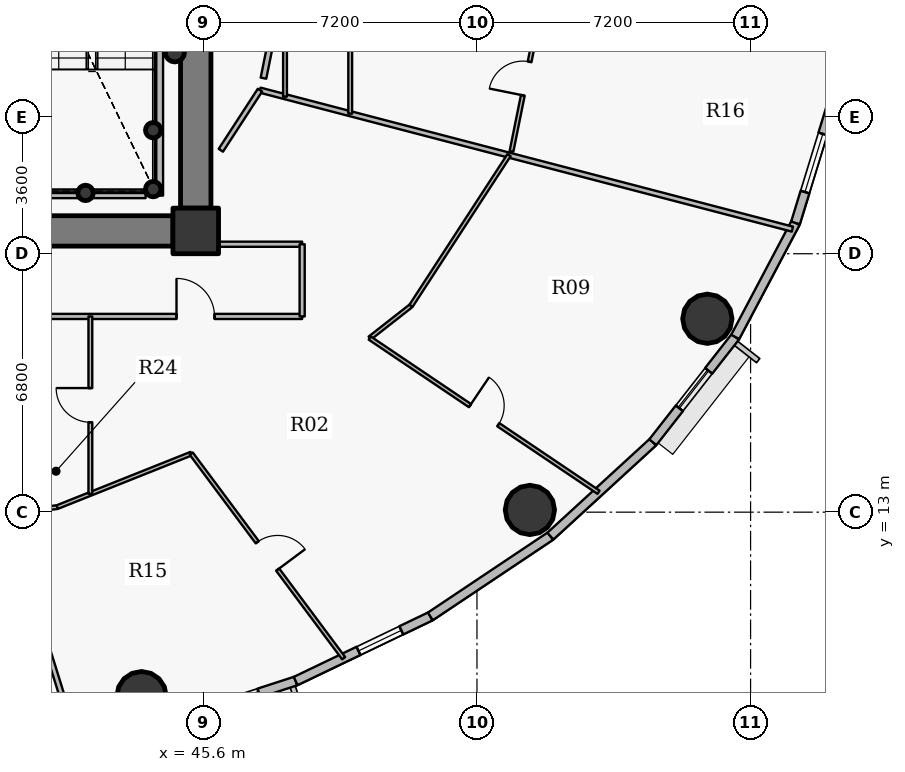
"""IFC4 building model, lengths in metres.
Left out: names, types, materials, properties, quantities, classifications, styles, units other than length and angle.
Written with IfcOpenShell. Run it as: python <this file> out.ifc"""

import sys

from ifc_helpers import new_model, si_unit, direction, frame, frame_2d, origin, origin_2d, place, context, subcontext, project, spatial, rectangle, hollow_circle, extrude, source, transform, mapped, element, fill, save


model = new_model("IFC4")
c1 = context("Model", 3, precision=1e-05, world=origin(), true_north=direction((0.0, 1.0)))
c2 = subcontext(c1, "Body", "Model", "MODEL_VIEW")
j1 = project(units=[si_unit("LENGTHUNIT", "METRE"), si_unit("PLANEANGLEUNIT", "RADIAN")], contexts=[c1])
p1 = place(None, origin())
s1 = spatial("IfcSite", under=j1, at=p1, CompositionType="ELEMENT")
p2 = place(p1, origin())
s2 = spatial("IfcBuilding", under=s1, at=p2, CompositionType="ELEMENT")
p3 = place(p2, frame((0.0, 0.0, 182.4)))
s3 = spatial("IfcBuildingStorey", under=s2, at=p3, CompositionType="ELEMENT", Elevation=182.4)
p4 = place(p3, frame((45.4, 20.4, 0.0), z_axis=(0.0, 0.0, 1.0), x_axis=(1.0, 0.0, 0.0)))
e1 = element("IfcColumn", 1, at=p4, inside=s3, PredefinedType="COLUMN", context=c2, shape_type="SweptSolid", body=[
    extrude(rectangle(XDim=1.2, YDim=1.2, at=origin_2d()), origin(), (0.0, 0.0, 1.0), 3.75),
])
for number, where, z_axis, x_axis in (
    (2, (44.28, 21.5, 0.0), (0.0, 0.0, 1.0), (1.0, 0.0, 0.0)),
    (3, (44.28, 23.05, 0.0), (0.0, 0.0, 1.0), (1.0, 0.0, 0.0)),
    (4, (42.5, 21.4, 0.0), (0.0, 0.0, 1.0), (1.0, 0.0, 0.0)),
):
    element("IfcColumn", number, at=place(p3, frame(where, z_axis=z_axis, x_axis=x_axis)), inside=s3, PredefinedType="COLUMN", context=c2, shape_type="SweptSolid", body=[
        extrude(hollow_circle(Radius=0.203, WallThickness=0.016, at=origin_2d()), origin(), (0.0, 0.0, 1.0), 3.75),
    ])
p5 = place(p3, frame((45.4, 33.0, 0.0), z_axis=(0.0, 0.0, 1.0), x_axis=(0.0, -1.0, 0.0)))
e5 = element("IfcWall", 5, at=p5, inside=s3, PredefinedType="SHEAR", context=c2, shape_type="SweptSolid", body=[
    extrude(rectangle(XDim=12.0, YDim=0.8, at=frame_2d((6.0, 0.0))), origin(), (0.0, 0.0, 1.0), 2.95),
])
p6 = place(p3, frame((44.8, 20.4, 0.0), z_axis=(0.0, 0.0, 1.0), x_axis=(-1.0, 0.0, 0.0)))
e6 = element("IfcWall", 6, at=p6, inside=s3, PredefinedType="SHEAR", context=c2, shape_type="SweptSolid", body=[
    extrude(rectangle(XDim=17.6, YDim=0.8, at=frame_2d((8.8, 0.0))), origin(), (0.0, 0.0, 1.0), 2.95),
])
p7 = place(p6, frame((9.55, 0.0, 0.0)))
e7 = element("IfcOpeningElement", 7, at=p7, cuts=e6, PredefinedType="OPENING", context=c2, shape_type="SweptSolid", body=[
    extrude(rectangle(XDim=1.15, YDim=2.15, at=origin_2d()), frame((0.575, 0.41, 1.075), z_axis=(0.0, -1.0, 0.0), x_axis=(1.0, 0.0, 0.0)), (0.0, 0.0, 1.0), 0.82),
])
for number, where, z_axis, x_axis in (
    (8, (43.973, 8.159, 0.0), (0.0, 0.0, 1.0), (1.0, 0.0, 0.0)),
    (9, (54.192, 13.058, 0.0), (0.0, 0.0, 1.0), (1.0, 0.0, 0.0)),
    (10, (58.863, 18.089, 0.0), (0.0, 0.0, 1.0), (1.0, 0.0, 0.0)),
):
    element("IfcColumn", number, at=place(p3, frame(where, z_axis=z_axis, x_axis=x_axis)), inside=s3, PredefinedType="COLUMN", context=c2, shape_type="SweptSolid", body=[
        extrude(hollow_circle(Radius=0.65, WallThickness=0.04, at=origin_2d()), origin(), (0.0, 0.0, 1.0), 3.75),
    ])
p8 = place(p3, frame((44.85, 25.1, 0.0), z_axis=(0.0, 0.0, 1.0), x_axis=(1.0, 0.0, 0.0)))
e11 = element("IfcColumn", 11, at=p8, inside=s3, PredefinedType="COLUMN", context=c2, shape_type="SweptSolid", body=[
    extrude(hollow_circle(Radius=0.254, WallThickness=0.02, at=origin_2d()), origin(), (0.0, 0.0, 1.0), 3.75),
])
p9 = place(p3, frame((48.03, 8.556, 0.0), z_axis=(0.0, 0.0, 1.0), x_axis=(-0.951209870236, -0.30854462038, 0.0)))
e12 = element("IfcWall", 12, at=p9, inside=s3, PredefinedType="SOLIDWALL", context=c2, shape_type="SweptSolid", body=[
    extrude(rectangle(XDim=4.038, YDim=0.24, at=frame_2d((2.019, 0.0))), origin(), (0.0, 0.0, 1.0), 3.5),
])
p10 = place(p9, frame((1.019, 0.0, 0.9)))
e13 = element("IfcOpeningElement", 13, at=p10, cuts=e12, PredefinedType="OPENING", context=c2, shape_type="SweptSolid", body=[
    extrude(rectangle(XDim=2.0, YDim=1.75, at=origin_2d()), frame((1.0, 0.13, 0.875), z_axis=(0.0, -1.0, 0.0), x_axis=(1.0, 0.0, 0.0)), (0.0, 0.0, 1.0), 0.26),
])
p11 = place(p3, frame((51.573, 10.257, 0.0), z_axis=(0.0, 0.0, 1.0), x_axis=(-0.901564733809, -0.432644231155, 0.0)))
e14 = element("IfcWall", 14, at=p11, inside=s3, PredefinedType="SOLIDWALL", context=c2, shape_type="SweptSolid", body=[
    extrude(rectangle(XDim=3.93, YDim=0.24, at=frame_2d((1.965, 0.0))), origin(), (0.0, 0.0, 1.0), 3.5),
])
p12 = place(p11, frame((0.848, 0.0, 0.9)))
e15 = element("IfcOpeningElement", 15, at=p12, cuts=e14, PredefinedType="OPENING", context=c2, shape_type="SweptSolid", body=[
    extrude(rectangle(XDim=1.25, YDim=1.65, at=origin_2d()), frame((0.625, 0.13, 0.825), z_axis=(0.0, -1.0, 0.0), x_axis=(1.0, 0.0, 0.0)), (0.0, 0.0, 1.0), 0.26),
])
p13 = place(p3, frame((54.732, 12.369, 0.0), z_axis=(0.0, 0.0, 1.0), x_axis=(-0.831228998277, -0.555930168657, 0.0)))
e16 = element("IfcWall", 16, at=p13, inside=s3, PredefinedType="SOLIDWALL", context=c2, shape_type="SweptSolid", body=[
    extrude(rectangle(XDim=3.8, YDim=0.24, at=frame_2d((1.9, 0.0))), origin(), (0.0, 0.0, 1.0), 3.5),
])
p14 = place(p3, frame((57.428, 14.842, 0.0), z_axis=(0.0, 0.0, 1.0), x_axis=(-0.737076565834, -0.675809245349, 0.0)))
e17 = element("IfcWall", 17, at=p14, inside=s3, PredefinedType="SOLIDWALL", context=c2, shape_type="SweptSolid", body=[
    extrude(rectangle(XDim=3.658, YDim=0.24, at=frame_2d((1.829, 0.0))), origin(), (0.0, 0.0, 1.0), 3.5),
])
p15 = place(p3, frame((59.596, 17.612, 0.0), z_axis=(0.0, 0.0, 1.0), x_axis=(-0.616287674549, -0.787521112224, 0.0)))
e18 = element("IfcWall", 18, at=p15, inside=s3, PredefinedType="SOLIDWALL", context=c2, shape_type="SweptSolid", body=[
    extrude(rectangle(XDim=3.517, YDim=0.24, at=frame_2d((1.759, 0.0))), origin(), (0.0, 0.0, 1.0), 3.5),
])
p16 = place(p15, frame((1.134, 0.0, 0.9)))
e19 = element("IfcOpeningElement", 19, at=p16, cuts=e18, PredefinedType="OPENING", context=c2, shape_type="SweptSolid", body=[
    extrude(rectangle(XDim=1.25, YDim=1.65, at=origin_2d()), frame((0.625, 0.13, 0.825), z_axis=(0.0, -1.0, 0.0), x_axis=(1.0, 0.0, 0.0)), (0.0, 0.0, 1.0), 0.26),
])
p17 = place(p3, frame((61.183, 20.611, 0.0), z_axis=(0.0, 0.0, 1.0), x_axis=(-0.467586874938, -0.88394712194, 0.0)))
e20 = element("IfcWall", 20, at=p17, inside=s3, PredefinedType="SOLIDWALL", context=c2, shape_type="SweptSolid", body=[
    extrude(rectangle(XDim=3.393, YDim=0.24, at=frame_2d((1.697, 0.0))), origin(), (0.0, 0.0, 1.0), 3.5),
])
p18 = place(p3, frame((62.15, 23.766, 0.0), z_axis=(0.0, 0.0, 1.0), x_axis=(-0.293097995113, -0.956082405058, 0.0)))
e21 = element("IfcWall", 21, at=p18, inside=s3, PredefinedType="SOLIDWALL", context=c2, shape_type="SweptSolid", body=[
    extrude(rectangle(XDim=3.3, YDim=0.24, at=frame_2d((1.65, 0.0))), origin(), (0.0, 0.0, 1.0), 3.5),
])
p19 = place(p18, frame((0.85, 0.0, 0.9)))
e22 = element("IfcOpeningElement", 22, at=p19, cuts=e21, PredefinedType="OPENING", context=c2, shape_type="SweptSolid", body=[
    extrude(rectangle(XDim=1.6, YDim=1.75, at=origin_2d()), frame((0.8, 0.13, 0.875), z_axis=(0.0, -1.0, 0.0), x_axis=(1.0, 0.0, 0.0)), (0.0, 0.0, 1.0), 0.26),
])
p20 = place(p3, frame((36.0, 12.419, 0.0), z_axis=(0.0, 0.0, 1.0), x_axis=(0.992396615981, 0.123081097612, 0.0)))
e23 = element("IfcWall", 23, at=p20, inside=s3, PredefinedType="PARTITIONING", context=c2, shape_type="SweptSolid", body=[
    extrude(rectangle(XDim=5.798, YDim=0.1, at=frame_2d((2.899, 0.0))), origin(), (0.0, 0.0, 1.0), 2.935),
])
p21 = place(p3, frame((38.764, 18.15, 0.0), z_axis=(0.0, 0.0, 1.0), x_axis=(0.298084348379, -0.954539533624, 0.0)))
e24 = element("IfcWall", 24, at=p21, inside=s3, PredefinedType="PARTITIONING", context=c2, shape_type="SweptSolid", body=[
    extrude(rectangle(XDim=11.74, YDim=0.135, at=frame_2d((5.87, 0.0))), origin(), (0.0, 0.0, 1.0), 2.935),
])
p22 = place(p3, frame((38.764, 18.15, 0.0), z_axis=(0.0, 0.0, 1.0), x_axis=(1.0, 0.0, 0.0)))
e25 = element("IfcWall", 25, at=p22, inside=s3, PredefinedType="PARTITIONING", context=c2, shape_type="SweptSolid", body=[
    extrude(rectangle(XDim=9.436, YDim=0.135, at=frame_2d((4.718, 0.0))), origin(), (0.0, 0.0, 1.0), 2.935),
])
p23 = place(p22, frame((6.13, 0.0, 0.0)))
e26 = element("IfcOpeningElement", 26, at=p23, cuts=e25, PredefinedType="OPENING", context=c2, shape_type="SweptSolid", body=[
    extrude(rectangle(XDim=1.0, YDim=2.15, at=origin_2d()), frame((0.5, 0.078, 1.075), z_axis=(0.0, -1.0, 0.0), x_axis=(1.0, 0.0, 0.0)), (0.0, 0.0, 1.0), 0.155),
])
p24 = place(p3, frame((41.754, 13.133, 0.0), z_axis=(0.0, 0.0, 1.0), x_axis=(0.928786664236, 0.370614803182, 0.0)))
e27 = element("IfcWall", 27, at=p24, inside=s3, PredefinedType="PARTITIONING", context=c2, shape_type="SweptSolid", body=[
    extrude(rectangle(XDim=3.798, YDim=0.1, at=frame_2d((1.899, 0.0))), origin(), (0.0, 0.0, 1.0), 2.935),
])
p25 = place(p3, frame((42.627, 13.481, 0.0), z_axis=(0.0, 0.0, 1.0), x_axis=(0.0, 1.0, 0.0)))
e28 = element("IfcWall", 28, at=p25, inside=s3, PredefinedType="PARTITIONING", context=c2, shape_type="SweptSolid", body=[
    extrude(rectangle(XDim=4.669, YDim=0.1, at=frame_2d((2.334, 0.0))), origin(), (0.0, 0.0, 1.0), 3.5),
])
p26 = place(p25, frame((1.885, 0.0, 0.0)))
e29 = element("IfcOpeningElement", 29, at=p26, cuts=e28, PredefinedType="OPENING", context=c2, shape_type="SweptSolid", body=[
    extrude(rectangle(XDim=0.9, YDim=2.1, at=origin_2d()), frame((0.45, 0.06, 1.05), z_axis=(0.0, -1.0, 0.0), x_axis=(1.0, 0.0, 0.0)), (0.0, 0.0, 1.0), 0.12),
])
p27 = place(p3, frame((44.44, 21.33, 0.0), z_axis=(0.0, 0.0, 1.0), x_axis=(0.0, 1.0, 0.0)))
e30 = element("IfcWall", 30, at=p27, inside=s3, PredefinedType="PARTITIONING", context=c2, shape_type="SweptSolid", body=[
    extrude(rectangle(XDim=8.52, YDim=0.2, at=frame_2d((4.26, 0.0))), origin(), (0.0, 0.0, 1.0), 3.5),
])
p28 = place(p3, frame((45.282, 14.54, 0.0), z_axis=(0.0, 0.0, 1.0), x_axis=(0.597407497301, -0.801937829366, 0.0)))
e31 = element("IfcWall", 31, at=p28, inside=s3, PredefinedType="PARTITIONING", context=c2, shape_type="SweptSolid", body=[
    extrude(rectangle(XDim=6.713, YDim=0.1, at=frame_2d((3.356, 0.0))), origin(), (0.0, 0.0, 1.0), 2.935),
])
p29 = place(p28, frame((2.906, 0.0, 0.0)))
e32 = element("IfcOpeningElement", 32, at=p29, cuts=e31, PredefinedType="OPENING", context=c2, shape_type="SweptSolid", body=[
    extrude(rectangle(XDim=0.9, YDim=2.1, at=origin_2d()), frame((0.45, 0.06, 1.05), z_axis=(0.0, -1.0, 0.0), x_axis=(1.0, 0.0, 0.0)), (0.0, 0.0, 1.0), 0.12),
])
p30 = place(p3, frame((45.8, 20.05, 0.0), z_axis=(0.0, 0.0, 1.0), x_axis=(1.0, 0.0, 0.0)))
e33 = element("IfcWall", 33, at=p30, inside=s3, PredefinedType="PARTITIONING", context=c2, shape_type="SweptSolid", body=[
    extrude(rectangle(XDim=2.4, YDim=0.135, at=frame_2d((1.2, 0.0))), origin(), (0.0, 0.0, 1.0), 3.5),
])
p31 = place(p3, frame((47.09, 24.105, 0.0), z_axis=(0.0, 0.0, 1.0), x_axis=(0.967573213792, -0.252590728159, 0.0)))
e34 = element("IfcWall", 34, at=p31, inside=s3, PredefinedType="PARTITIONING", context=c2, shape_type="SweptSolid", body=[
    extrude(rectangle(XDim=14.481, YDim=0.135, at=frame_2d((7.24, 0.0))), origin(), (0.0, 0.0, 1.0), 2.935),
])
p32 = place(p3, frame((47.749, 23.933, 0.0), z_axis=(0.0, 0.0, 1.0), x_axis=(0.0, 1.0, 0.0)))
e35 = element("IfcWall", 35, at=p32, inside=s3, PredefinedType="PARTITIONING", context=c2, shape_type="SweptSolid", body=[
    extrude(rectangle(XDim=9.314, YDim=0.1, at=frame_2d((4.657, 0.0))), origin(), (0.0, 0.0, 1.0), 2.935),
])
p33 = place(p32, frame((3.03, 0.0, 0.0)))
e36 = element("IfcOpeningElement", 36, at=p33, cuts=e35, PredefinedType="OPENING", context=c2, shape_type="SweptSolid", body=[
    extrude(rectangle(XDim=0.76, YDim=2.1, at=origin_2d()), frame((0.38, 0.06, 1.05), z_axis=(0.0, -1.0, 0.0), x_axis=(1.0, 0.0, 0.0)), (0.0, 0.0, 1.0), 0.12),
])
p34 = place(p3, frame((48.2, 18.15, 0.0), z_axis=(0.0, 0.0, 1.0), x_axis=(0.0, 1.0, 0.0)))
e37 = element("IfcWall", 37, at=p34, inside=s3, PredefinedType="PARTITIONING", context=c2, shape_type="SweptSolid", body=[
    extrude(rectangle(XDim=1.9, YDim=0.135, at=frame_2d((0.95, 0.0))), origin(), (0.0, 0.0, 1.0), 3.5),
])
p35 = place(p3, frame((49.464, 23.485, 0.0), z_axis=(0.0, 0.0, 1.0), x_axis=(0.0, 1.0, 0.0)))
e38 = element("IfcWall", 38, at=p35, inside=s3, PredefinedType="PARTITIONING", context=c2, shape_type="SweptSolid", body=[
    extrude(rectangle(XDim=10.465, YDim=0.1, at=frame_2d((5.232, 0.0))), origin(), (0.0, 0.0, 1.0), 2.935),
])
p36 = place(p35, frame((4.783, 0.0, 0.0)))
e39 = element("IfcOpeningElement", 39, at=p36, cuts=e38, PredefinedType="OPENING", context=c2, shape_type="SweptSolid", body=[
    extrude(rectangle(XDim=0.9, YDim=2.1, at=origin_2d()), frame((0.45, 0.06, 1.05), z_axis=(0.0, -1.0, 0.0), x_axis=(1.0, 0.0, 0.0)), (0.0, 0.0, 1.0), 0.12),
])
p37 = place(p3, frame((49.979, 17.58, 0.0), z_axis=(0.0, 0.0, 1.0), x_axis=(0.787344176355, 0.6165137046, 0.0)))
e40 = element("IfcWall", 40, at=p37, inside=s3, PredefinedType="PARTITIONING", context=c2, shape_type="SweptSolid", body=[
    extrude(rectangle(XDim=1.378, YDim=0.1, at=frame_2d((0.689, 0.0))), origin(), (0.0, 0.0, 1.0), 3.5),
])
p38 = place(p3, frame((49.979, 17.58, 0.0), z_axis=(0.0, 0.0, 1.0), x_axis=(0.829313188428, -0.55878406876, 0.0)))
e41 = element("IfcWall", 41, at=p38, inside=s3, PredefinedType="PARTITIONING", context=c2, shape_type="SweptSolid", body=[
    extrude(rectangle(XDim=7.259, YDim=0.1, at=frame_2d((3.629, 0.0))), origin(), (0.0, 0.0, 1.0), 2.935),
])
p39 = place(p38, frame((3.179, 0.0, 0.0)))
e42 = element("IfcOpeningElement", 42, at=p39, cuts=e41, PredefinedType="OPENING", context=c2, shape_type="SweptSolid", body=[
    extrude(rectangle(XDim=0.9, YDim=2.1, at=origin_2d()), frame((0.45, 0.06, 1.05), z_axis=(0.0, -1.0, 0.0), x_axis=(1.0, 0.0, 0.0)), (0.0, 0.0, 1.0), 0.12),
])
p40 = place(p3, frame((51.064, 18.429, 0.0), z_axis=(0.0, 0.0, 1.0), x_axis=(0.545362062942, 0.838200584767, 0.0)))
e43 = element("IfcWall", 43, at=p40, inside=s3, PredefinedType="PARTITIONING", context=c2, shape_type="SweptSolid", body=[
    extrude(rectangle(XDim=4.729, YDim=0.1, at=frame_2d((2.365, 0.0))), origin(), (0.0, 0.0, 1.0), 2.935),
])
p41 = place(p3, frame((53.709, 22.494, 0.0), z_axis=(0.0, 0.0, 1.0), x_axis=(0.198239863178, 0.980153537282, 0.0)))
e44 = element("IfcWall", 44, at=p41, inside=s3, PredefinedType="PARTITIONING", context=c2, shape_type="SweptSolid", body=[
    extrude(rectangle(XDim=4.597, YDim=0.1, at=frame_2d((2.299, 0.0))), origin(), (0.0, 0.0, 1.0), 2.935),
])
p42 = place(p41, frame((1.504, 0.0, 0.0)))
e45 = element("IfcOpeningElement", 45, at=p42, cuts=e44, PredefinedType="OPENING", context=c2, shape_type="SweptSolid", body=[
    extrude(rectangle(XDim=0.9, YDim=2.1, at=origin_2d()), frame((0.45, 0.06, 1.05), z_axis=(0.0, -1.0, 0.0), x_axis=(1.0, 0.0, 0.0)), (0.0, 0.0, 1.0), 0.12),
])
p43 = place(p3, frame((44.08, 21.33, 0.0), z_axis=(0.0, 0.0, 1.0), x_axis=(-1.0, 0.0, 0.0)))
e46 = element("IfcWall", 46, at=p43, inside=s3, PredefinedType="PARTITIONING", context=c2, shape_type="SweptSolid", body=[
    extrude(rectangle(XDim=2.82, YDim=0.135, at=frame_2d((1.41, 0.0))), origin(), (0.0, 0.0, 1.0), 3.035),
])
p44 = place(p3, frame((44.81, 20.0, 0.0), z_axis=(0.0, 0.0, 1.0), x_axis=(1.0, 0.0, 0.0)))
e47 = element("IfcWall", 47, at=p44, inside=s3, PredefinedType="PARTITIONING", context=c2, shape_type="SweptSolid", body=[
    extrude(rectangle(XDim=0.98, YDim=0.135, at=frame_2d((0.49, 0.0))), origin(), (0.0, 0.0, 1.0), 2.935),
])
p45 = place(p3, frame((45.8, 20.377, 0.0), z_axis=(0.0, 0.0, 1.0), x_axis=(0.0, 1.0, 0.0)))
e48 = element("IfcWall", 48, at=p45, inside=s3, PredefinedType="PARTITIONING", context=c2, shape_type="SweptSolid", body=[
    extrude(rectangle(XDim=0.613, YDim=0.135, at=frame_2d((0.306, 0.0))), origin(), (0.0, 0.0, 1.0), 3.5),
])
p46 = place(p3, frame((46.06, 22.521, 0.0), z_axis=(0.0, 0.0, 1.0), x_axis=(0.545329049498, 0.838222063521, 0.0)))
e49 = element("IfcWall", 49, at=p46, inside=s3, PredefinedType="PARTITIONING", context=c2, shape_type="SweptSolid", body=[
    extrude(rectangle(XDim=1.889, YDim=0.135, at=frame_2d((0.944, 0.0))), origin(), (0.0, 0.0, 1.0), 2.935),
])
p47 = place(p3, frame((47.182, 24.419, 0.0), z_axis=(0.0, 0.0, 1.0), x_axis=(0.198178705385, 0.980165904698, 0.0)))
e50 = element("IfcWall", 50, at=p47, inside=s3, PredefinedType="PARTITIONING", context=c2, shape_type="SweptSolid", body=[
    extrude(rectangle(XDim=1.297, YDim=0.15, at=frame_2d((0.648, 0.0))), origin(), (0.0, 0.0, 1.0), 3.5),
])
m1 = source(origin(), c2, "Body", "SweptSolid", [
    extrude(rectangle(XDim=2.0, YDim=1.75, at=origin_2d()), frame((1.0, 0.03, 0.875), z_axis=(0.0, -1.0, 0.0), x_axis=(1.0, 0.0, 0.0)), (0.0, 0.0, 1.0), 0.06),
])
p48 = place(p10, origin())
e51 = element("IfcWindow", 51, at=p48, inside=s3, PartitioningType="DOUBLE_PANEL_VERTICAL", PredefinedType="WINDOW", context=c2, shape_type="MappedRepresentation", body=[
    mapped(m1, transform((0.0, 0.0, 0.0), x_axis=(1.0, 0.0, 0.0), y_axis=(0.0, 1.0, 0.0), z_axis=(0.0, 0.0, 1.0), scale=1.0)),
])
fill(e13, e51)
m2 = source(origin(), c2, "Body", "SweptSolid", [
    extrude(rectangle(XDim=1.25, YDim=1.65, at=origin_2d()), frame((0.625, 0.03, 0.825), z_axis=(0.0, -1.0, 0.0), x_axis=(1.0, 0.0, 0.0)), (0.0, 0.0, 1.0), 0.06),
])
p49 = place(p12, origin())
e52 = element("IfcWindow", 52, at=p49, inside=s3, PartitioningType="SINGLE_PANEL", PredefinedType="WINDOW", context=c2, shape_type="MappedRepresentation", body=[
    mapped(m2, transform((0.0, 0.0, 0.0), x_axis=(1.0, 0.0, 0.0), y_axis=(0.0, 1.0, 0.0), z_axis=(0.0, 0.0, 1.0), scale=1.0)),
])
fill(e15, e52)
m3 = source(origin(), c2, "Body", "SweptSolid", [
    extrude(rectangle(XDim=1.6, YDim=1.75, at=origin_2d()), frame((0.8, 0.03, 0.875), z_axis=(0.0, -1.0, 0.0), x_axis=(1.0, 0.0, 0.0)), (0.0, 0.0, 1.0), 0.06),
])
p50 = place(p19, origin())
e53 = element("IfcWindow", 53, at=p50, inside=s3, PartitioningType="DOUBLE_PANEL_VERTICAL", PredefinedType="WINDOW", context=c2, shape_type="MappedRepresentation", body=[
    mapped(m3, transform((0.0, 0.0, 0.0), x_axis=(1.0, 0.0, 0.0), y_axis=(0.0, 1.0, 0.0), z_axis=(0.0, 0.0, 1.0), scale=1.0)),
])
fill(e22, e53)
p51 = place(p16, origin())
e54 = element("IfcWindow", 54, at=p51, inside=s3, PartitioningType="SINGLE_PANEL", PredefinedType="WINDOW", context=c2, shape_type="MappedRepresentation", body=[
    mapped(m2, transform((0.0, 0.0, 0.0), x_axis=(1.0, 0.0, 0.0), y_axis=(0.0, 1.0, 0.0), z_axis=(0.0, 0.0, 1.0), scale=1.0)),
])
fill(e19, e54)
m4 = source(origin(), c2, "Body", "SweptSolid", [
    extrude(rectangle(XDim=1.0, YDim=2.15, at=origin_2d()), frame((0.5, 0.025, 1.075), z_axis=(0.0, -1.0, 0.0), x_axis=(1.0, 0.0, 0.0)), (0.0, 0.0, 1.0), 0.05),
])
p52 = place(p23, origin())
e55 = element("IfcDoor", 55, at=p52, inside=s3, OperationType="SINGLE_SWING_LEFT", PredefinedType="DOOR", context=c2, shape_type="MappedRepresentation", body=[
    mapped(m4, transform((0.0, 0.0, 0.0), x_axis=(1.0, 0.0, 0.0), y_axis=(0.0, 1.0, 0.0), z_axis=(0.0, 0.0, 1.0), scale=1.0)),
])
fill(e26, e55)
m5 = source(origin(), c2, "Body", "SweptSolid", [
    extrude(rectangle(XDim=0.9, YDim=2.1, at=origin_2d()), frame((0.45, 0.025, 1.05), z_axis=(0.0, -1.0, 0.0), x_axis=(1.0, 0.0, 0.0)), (0.0, 0.0, 1.0), 0.05),
])
p53 = place(p29, origin())
e56 = element("IfcDoor", 56, at=p53, inside=s3, OperationType="SINGLE_SWING_RIGHT", PredefinedType="DOOR", context=c2, shape_type="MappedRepresentation", body=[
    mapped(m5, transform((0.0, 0.0, 0.0), x_axis=(1.0, 0.0, 0.0), y_axis=(0.0, 1.0, 0.0), z_axis=(0.0, 0.0, 1.0), scale=1.0)),
])
fill(e32, e56)
p54 = place(p39, origin())
e57 = element("IfcDoor", 57, at=p54, inside=s3, OperationType="SINGLE_SWING_LEFT", PredefinedType="DOOR", context=c2, shape_type="MappedRepresentation", body=[
    mapped(m5, transform((0.0, 0.0, 0.0), x_axis=(1.0, 0.0, 0.0), y_axis=(0.0, 1.0, 0.0), z_axis=(0.0, 0.0, 1.0), scale=1.0)),
])
fill(e42, e57)
p55 = place(p26, origin())
e58 = element("IfcDoor", 58, at=p55, inside=s3, OperationType="SINGLE_SWING_RIGHT", PredefinedType="DOOR", context=c2, shape_type="MappedRepresentation", body=[
    mapped(m5, transform((0.0, 0.0, 0.0), x_axis=(1.0, 0.0, 0.0), y_axis=(0.0, 1.0, 0.0), z_axis=(0.0, 0.0, 1.0), scale=1.0)),
])
fill(e29, e58)
p56 = place(p42, origin())
e59 = element("IfcDoor", 59, at=p56, inside=s3, OperationType="SINGLE_SWING_LEFT", PredefinedType="DOOR", context=c2, shape_type="MappedRepresentation", body=[
    mapped(m5, transform((0.0, 0.0, 0.0), x_axis=(1.0, 0.0, 0.0), y_axis=(0.0, 1.0, 0.0), z_axis=(0.0, 0.0, 1.0), scale=1.0)),
])
fill(e45, e59)
save(model, sys.argv[1])
